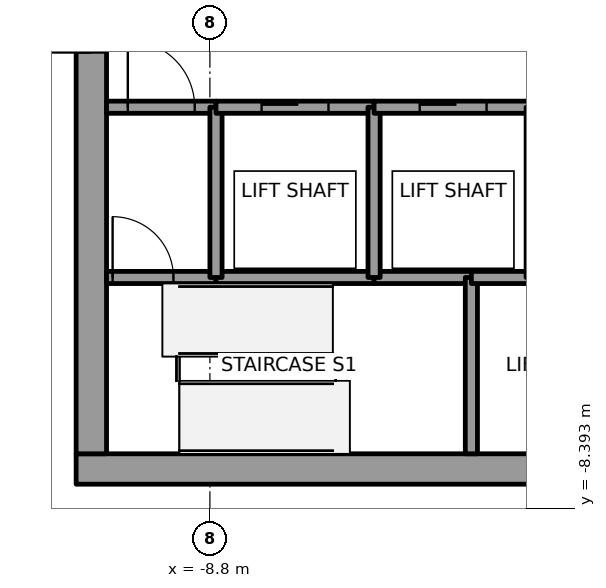
"""IFC4 building model, lengths in metres.
Left out: names, types, materials, properties, quantities, classifications, styles, units other than length and angle.
Written with IfcOpenShell. Run it as: python <this file> out.ifc"""

import sys

from ifc_helpers import new_model, si_unit, direction, frame, frame_2d, origin, place, context, subcontext, project, spatial, rectangle, extrude, element, fill, save


model = new_model("IFC4")
c1 = context("Model", 3, precision=1e-05, world=origin(), true_north=direction((0.0, 1.0)))
c2 = subcontext(c1, "Body", "Model", "MODEL_VIEW")
j1 = project(units=[si_unit("LENGTHUNIT", "METRE"), si_unit("PLANEANGLEUNIT", "RADIAN")], contexts=[c1])
p1 = place(None, origin())
s1 = spatial("IfcSite", under=j1, at=p1, CompositionType="ELEMENT")
p2 = place(p1, origin())
s2 = spatial("IfcBuilding", under=s1, at=p2, CompositionType="ELEMENT")
p3 = place(p2, frame((0.0, 0.0, 219.8)))
s3 = spatial("IfcBuildingStorey", under=s2, at=p3, CompositionType="ELEMENT", Elevation=219.8)
p4 = place(p3, frame((-11.0, -7.75, 0.0), z_axis=(0.0, 0.0, 1.0), x_axis=(1.0, 0.0, 0.0)))
e1 = element("IfcWall", 1, at=p4, inside=s3, PredefinedType="SHEAR", context=c2, shape_type="SweptSolid", body=[
    extrude(rectangle(XDim=22.0, YDim=0.5, at=frame_2d((11.0, 0.0))), origin(), (0.0, 0.0, 1.0), 7.2),
])
p5 = place(p4, frame((10.45, 0.0, 0.0)))
e2 = element("IfcOpeningElement", 2, at=p5, cuts=e1, PredefinedType="OPENING", context=c2, shape_type="SweptSolid", body=[
    extrude(rectangle(XDim=1.1, YDim=2.1, at=frame_2d((0.55, 1.05))), frame((0.0, 0.25, 0.0), z_axis=(0.0, -1.0, 0.0), x_axis=(1.0, 0.0, 0.0)), (0.0, 0.0, 1.0), 0.5),
])
p6 = place(p3, frame((-10.75, -7.5, 0.0), z_axis=(0.0, 0.0, 1.0), x_axis=(0.0, 1.0, 0.0)))
e3 = element("IfcWall", 3, at=p6, inside=s3, PredefinedType="SHEAR", context=c2, shape_type="SweptSolid", body=[
    extrude(rectangle(XDim=15.0, YDim=0.5, at=frame_2d((7.5, 0.0))), origin(), (0.0, 0.0, 1.0), 7.2),
])
p7 = place(p6, frame((6.6, 0.0, 0.0)))
e4 = element("IfcOpeningElement", 4, at=p7, cuts=e3, PredefinedType="OPENING", context=c2, shape_type="SweptSolid", body=[
    extrude(rectangle(XDim=1.8, YDim=2.1, at=frame_2d((0.9, 1.05))), frame((0.0, 0.25, 0.0), z_axis=(0.0, -1.0, 0.0), x_axis=(1.0, 0.0, 0.0)), (0.0, 0.0, 1.0), 0.5),
])
p8 = place(p3, frame((-10.5, -4.6, 0.0), z_axis=(0.0, 0.0, 1.0), x_axis=(1.0, 0.0, 0.0)))
e5 = element("IfcWall", 5, at=p8, inside=s3, PredefinedType="SOLIDWALL", context=c2, shape_type="SweptSolid", body=[
    extrude(rectangle(XDim=1.8, YDim=0.2, at=frame_2d((0.9, 0.0))), origin(), (0.0, 0.0, 1.0), 7.05),
])
p9 = place(p8, frame((0.1, 0.0, 0.0)))
e6 = element("IfcOpeningElement", 6, at=p9, cuts=e5, PredefinedType="OPENING", context=c2, shape_type="SweptSolid", body=[
    extrude(rectangle(XDim=1.0, YDim=2.1, at=frame_2d((0.5, 1.05))), frame((0.0, 0.1, 0.0), z_axis=(0.0, -1.0, 0.0), x_axis=(1.0, 0.0, 0.0)), (0.0, 0.0, 1.0), 0.2),
])
p10 = place(p3, frame((-10.5, -1.8, 0.0), z_axis=(0.0, 0.0, 1.0), x_axis=(1.0, 0.0, 0.0)))
e7 = element("IfcWall", 7, at=p10, inside=s3, PredefinedType="SOLIDWALL", context=c2, shape_type="SweptSolid", body=[
    extrude(rectangle(XDim=1.8, YDim=0.2, at=frame_2d((0.9, 0.0))), origin(), (0.0, 0.0, 1.0), 7.05),
])
p11 = place(p10, frame((0.35, 0.0, 0.0)))
e8 = element("IfcOpeningElement", 8, at=p11, cuts=e7, PredefinedType="OPENING", context=c2, shape_type="SweptSolid", body=[
    extrude(rectangle(XDim=1.1, YDim=2.1, at=frame_2d((0.55, 1.05))), frame((0.0, 0.1, 0.0), z_axis=(0.0, -1.0, 0.0), x_axis=(1.0, 0.0, 0.0)), (0.0, 0.0, 1.0), 0.2),
])
p12 = place(p3, frame((-8.7, -4.6, 0.0), z_axis=(0.0, 0.0, 1.0), x_axis=(1.0, 0.0, 0.0)))
e9 = element("IfcWall", 9, at=p12, inside=s3, PredefinedType="SOLIDWALL", context=c2, shape_type="SweptSolid", body=[
    extrude(rectangle(XDim=2.6, YDim=0.2, at=frame_2d((1.3, 0.0))), origin(), (0.0, 0.0, 1.0), 7.05),
])
p13 = place(p3, frame((-8.7, -4.6, 0.0), z_axis=(0.0, 0.0, 1.0), x_axis=(0.0, 1.0, 0.0)))
e10 = element("IfcWall", 10, at=p13, inside=s3, PredefinedType="SOLIDWALL", context=c2, shape_type="SweptSolid", body=[
    extrude(rectangle(XDim=2.8, YDim=0.2, at=frame_2d((1.4, 0.0))), origin(), (0.0, 0.0, 1.0), 7.05),
])
p14 = place(p3, frame((-8.7, -1.8, 0.0), z_axis=(0.0, 0.0, 1.0), x_axis=(1.0, 0.0, 0.0)))
e11 = element("IfcWall", 11, at=p14, inside=s3, PredefinedType="SOLIDWALL", context=c2, shape_type="SweptSolid", body=[
    extrude(rectangle(XDim=2.6, YDim=0.2, at=frame_2d((1.3, 0.0))), origin(), (0.0, 0.0, 1.0), 7.05),
])
p15 = place(p14, frame((0.75, 0.0, 0.0)))
e12 = element("IfcOpeningElement", 12, at=p15, cuts=e11, PredefinedType="OPENING", context=c2, shape_type="SweptSolid", body=[
    extrude(rectangle(XDim=1.1, YDim=2.1, at=frame_2d((0.55, 1.05))), frame((0.0, 0.1, 0.0), z_axis=(0.0, -1.0, 0.0), x_axis=(1.0, 0.0, 0.0)), (0.0, 0.0, 1.0), 0.2),
])
p16 = place(p3, frame((-6.1, -4.6, 0.0), z_axis=(0.0, 0.0, 1.0), x_axis=(1.0, 0.0, 0.0)))
e13 = element("IfcWall", 13, at=p16, inside=s3, PredefinedType="SOLIDWALL", context=c2, shape_type="SweptSolid", body=[
    extrude(rectangle(XDim=1.6, YDim=0.2, at=frame_2d((0.8, 0.0))), origin(), (0.0, 0.0, 1.0), 7.05),
])
p17 = place(p3, frame((-6.1, -4.6, 0.0), z_axis=(0.0, 0.0, 1.0), x_axis=(0.0, 1.0, 0.0)))
e14 = element("IfcWall", 14, at=p17, inside=s3, PredefinedType="SOLIDWALL", context=c2, shape_type="SweptSolid", body=[
    extrude(rectangle(XDim=2.8, YDim=0.2, at=frame_2d((1.4, 0.0))), origin(), (0.0, 0.0, 1.0), 7.05),
])
p18 = place(p3, frame((-6.1, -1.8, 0.0), z_axis=(0.0, 0.0, 1.0), x_axis=(1.0, 0.0, 0.0)))
e15 = element("IfcWall", 15, at=p18, inside=s3, PredefinedType="SOLIDWALL", context=c2, shape_type="SweptSolid", body=[
    extrude(rectangle(XDim=2.6, YDim=0.2, at=frame_2d((1.3, 0.0))), origin(), (0.0, 0.0, 1.0), 7.05),
])
p19 = place(p18, frame((0.75, 0.0, 0.0)))
e16 = element("IfcOpeningElement", 16, at=p19, cuts=e15, PredefinedType="OPENING", context=c2, shape_type="SweptSolid", body=[
    extrude(rectangle(XDim=1.1, YDim=2.1, at=frame_2d((0.55, 1.05))), frame((0.0, 0.1, 0.0), z_axis=(0.0, -1.0, 0.0), x_axis=(1.0, 0.0, 0.0)), (0.0, 0.0, 1.0), 0.2),
])
p20 = place(p3, frame((-4.5, -4.6, 0.0), z_axis=(0.0, 0.0, 1.0), x_axis=(0.0, -1.0, 0.0)))
e17 = element("IfcWall", 17, at=p20, inside=s3, PredefinedType="SOLIDWALL", context=c2, shape_type="SweptSolid", body=[
    extrude(rectangle(XDim=2.9, YDim=0.2, at=frame_2d((1.45, 0.0))), origin(), (0.0, 0.0, 1.0), 7.05),
])
p21 = place(p3, frame((-4.5, -4.6, 0.0), z_axis=(0.0, 0.0, 1.0), x_axis=(1.0, 0.0, 0.0)))
e18 = element("IfcWall", 18, at=p21, inside=s3, PredefinedType="SOLIDWALL", context=c2, shape_type="SweptSolid", body=[
    extrude(rectangle(XDim=1.0, YDim=0.2, at=frame_2d((0.5, 0.0))), origin(), (0.0, 0.0, 1.0), 7.05),
])
p22 = place(p15, origin())
e19 = element("IfcDoor", 19, at=p22, inside=s3, OperationType="SLIDING_TO_LEFT", PredefinedType="DOOR", context=c2, shape_type="SweptSolid", body=[
    extrude(rectangle(XDim=1.1, YDim=2.1, at=frame_2d((0.55, 1.05))), frame((0.0, 0.025, 0.0), z_axis=(0.0, -1.0, 0.0), x_axis=(1.0, 0.0, 0.0)), (0.0, 0.0, 1.0), 0.05),
])
fill(e12, e19)
p23 = place(p19, origin())
e20 = element("IfcDoor", 20, at=p23, inside=s3, OperationType="SLIDING_TO_LEFT", PredefinedType="DOOR", context=c2, shape_type="SweptSolid", body=[
    extrude(rectangle(XDim=1.1, YDim=2.1, at=frame_2d((0.55, 1.05))), frame((0.0, 0.025, 0.0), z_axis=(0.0, -1.0, 0.0), x_axis=(1.0, 0.0, 0.0)), (0.0, 0.0, 1.0), 0.05),
])
fill(e16, e20)
p24 = place(p11, origin())
e21 = element("IfcDoor", 21, at=p24, inside=s3, OperationType="SINGLE_SWING_RIGHT", PredefinedType="DOOR", context=c2, shape_type="SweptSolid", body=[
    extrude(rectangle(XDim=1.1, YDim=2.1, at=frame_2d((0.55, 1.05))), frame((0.0, 0.025, 0.0), z_axis=(0.0, -1.0, 0.0), x_axis=(1.0, 0.0, 0.0)), (0.0, 0.0, 1.0), 0.05),
])
fill(e8, e21)
p25 = place(p9, origin())
e22 = element("IfcDoor", 22, at=p25, inside=s3, OperationType="SINGLE_SWING_LEFT", PredefinedType="DOOR", context=c2, shape_type="SweptSolid", body=[
    extrude(rectangle(XDim=1.0, YDim=2.1, at=frame_2d((0.5, 1.05))), frame((0.0, 0.025, 0.0), z_axis=(0.0, -1.0, 0.0), x_axis=(1.0, 0.0, 0.0)), (0.0, 0.0, 1.0), 0.05),
])
fill(e6, e22)
p26 = place(p7, origin())
e23 = element("IfcDoor", 23, at=p26, inside=s3, OperationType="DOUBLE_DOOR_SINGLE_SWING", PredefinedType="DOOR", context=c2, shape_type="SweptSolid", body=[
    extrude(rectangle(XDim=1.8, YDim=2.1, at=frame_2d((0.9, 1.05))), frame((0.0, 0.025, 0.0), z_axis=(0.0, -1.0, 0.0), x_axis=(1.0, 0.0, 0.0)), (0.0, 0.0, 1.0), 0.05),
])
fill(e4, e23)
save(model, sys.argv[1])
